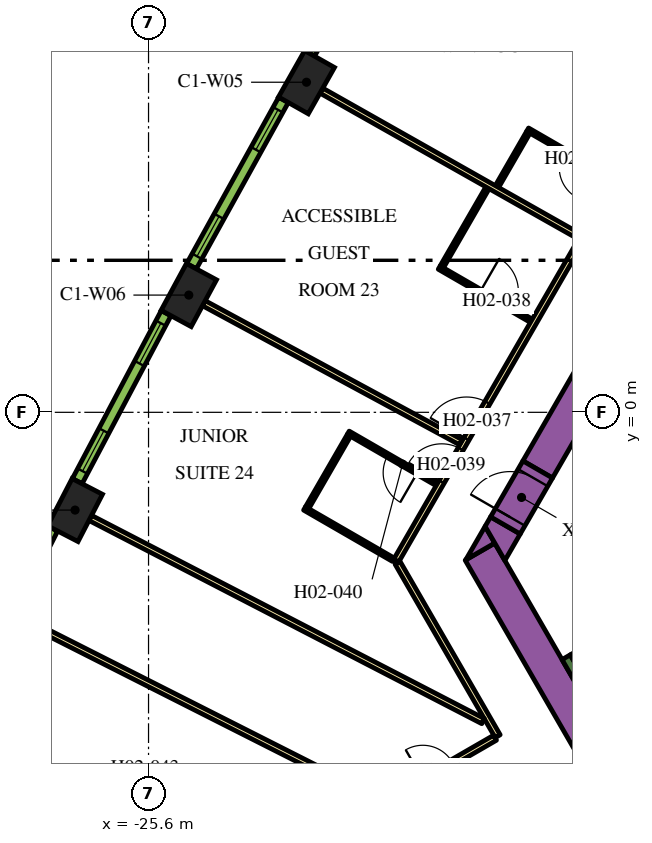
"""IFC4 building model, lengths in metres.
Left out: names, types, materials, properties, quantities, classifications, styles, units other than length and angle.
Written with IfcOpenShell. Run it as: python <this file> out.ifc"""

import sys

from ifc_helpers import new_model, si_unit, direction, frame, frame_2d, origin, origin_2d, place, context, subcontext, project, spatial, polyline, rectangle, outline, extrude, element, fill, save


model = new_model("IFC4")
c1 = context("Model", 3, precision=1e-05, world=origin(), true_north=direction((0.0, 1.0)))
c2 = subcontext(c1, "Body", "Model", "MODEL_VIEW")
j1 = project(units=[si_unit("LENGTHUNIT", "METRE"), si_unit("PLANEANGLEUNIT", "RADIAN")], contexts=[c1])
p1 = place(None, origin())
s1 = spatial("IfcSite", under=j1, at=p1, CompositionType="ELEMENT")
p2 = place(p1, origin())
s2 = spatial("IfcBuilding", under=s1, at=p2, CompositionType="ELEMENT")
p3 = place(p2, frame((0.0, 0.0, 43.2)))
s3 = spatial("IfcBuildingStorey", under=s2, at=p3, CompositionType="ELEMENT", Elevation=43.2)
for number, where, z_axis, x_axis in (
    (1, (-21.443, 8.685, 0.0), (0.0, 0.0, 1.0), (-0.492, -0.871, 0.0)),
    (2, (-24.54, 3.085, 0.0), (0.0, 0.0, 1.0), (-0.476, -0.88, 0.0)),
    (3, (-27.533, -2.572, 0.0), (0.0, 0.0, 1.0), (-0.459, -0.888, 0.0)),
):
    element("IfcColumn", number, at=place(p3, frame(where, z_axis=z_axis, x_axis=x_axis)), inside=s3, PredefinedType="COLUMN", context=c2, shape_type="SweptSolid", body=[
        extrude(rectangle(XDim=1.4, YDim=0.9, at=origin_2d()), origin(), (0.0, 0.0, 1.0), 3.9),
    ])
p4 = place(p3, frame((-15.36, -1.503, 0.0), z_axis=(0.0, 0.0, 1.0), x_axis=(0.50000389221, 0.866023156604, 0.0)))
e4 = element("IfcWall", 4, at=p4, inside=s3, PredefinedType="SOLIDWALL", context=c2, shape_type="SweptSolid", body=[
    extrude(rectangle(XDim=21.0, YDim=0.9, at=frame_2d((10.5, 0.0))), origin(), (0.0, 0.0, 1.0), 3.9),
])
p5 = place(p3, frame((-12.134, -11.883, 0.0), z_axis=(0.0, 0.0, 1.0), x_axis=(-0.500005339912, 0.866022320763, 0.0)))
e5 = element("IfcWall", 5, at=p5, inside=s3, PredefinedType="SOLIDWALL", context=c2, shape_type="SweptSolid", body=[
    extrude(rectangle(XDim=9.488, YDim=0.9, at=frame_2d((4.744, 0.0))), origin(), (0.0, 0.0, 1.0), 3.9),
])
p6 = place(p3, origin())
e6 = element("IfcWall", 6, at=p6, inside=s3, PredefinedType="SOLIDWALL", context=c2, shape_type="SweptSolid", body=[
    extrude(outline(polyline([(-16.489, -3.44), (-17.251, -3.88), (-16.743, -3.0), (-16.489, -3.44)])), origin(), (0.0, 0.0, 1.0), 3.9),
])
e7 = element("IfcWall", 7, at=p6, inside=s3, PredefinedType="SOLIDWALL", context=c2, shape_type="SweptSolid", body=[
    extrude(outline(polyline([(-15.82, -3.201), (-16.223, -3.9), (-16.743, -3.0), (-16.599, -2.751), (-15.82, -3.201)])), origin(), (0.0, 0.0, 1.0), 3.9),
])
p7 = place(p3, frame((-12.885, -9.431, 0.0), z_axis=(0.0, 0.0, 1.0), x_axis=(-0.500020560727, 0.866013532718, 0.0)))
e8 = element("IfcWall", 8, at=p7, inside=s3, PredefinedType="SOLIDWALL", context=c2, shape_type="SweptSolid", body=[
    extrude(rectangle(XDim=3.45, YDim=0.25, at=frame_2d((1.725, 0.0))), origin(), (0.0, 0.0, 1.0), 3.9),
])
p8 = place(p3, frame((-14.44, -6.49, 0.0), z_axis=(0.0, 0.0, 1.0), x_axis=(0.866022966069, 0.500004222222, 0.0)))
e9 = element("IfcWall", 9, at=p8, inside=s3, PredefinedType="SOLIDWALL", context=c2, shape_type="SweptSolid", body=[
    extrude(rectangle(XDim=6.8, YDim=0.25, at=frame_2d((3.4, 0.0))), origin(), (0.0, 0.0, 1.0), 3.9),
])
p9 = place(p3, frame((-16.209, -2.976, 0.0), z_axis=(0.0, 0.0, 1.0), x_axis=(0.499954529098, 0.86605165483, 0.0)))
e10 = element("IfcWall", 10, at=p9, inside=s3, PredefinedType="SOLIDWALL", context=c2, shape_type="SweptSolid", body=[
    extrude(rectangle(XDim=1.7, YDim=0.9, at=frame_2d((0.85, 0.0))), origin(), (0.0, 0.0, 1.0), 3.9),
])
p10 = place(p9, frame((0.25, 0.0, 0.0)))
e11 = element("IfcOpeningElement", 11, at=p10, cuts=e10, PredefinedType="OPENING", context=c2, shape_type="SweptSolid", body=[
    extrude(rectangle(XDim=1.2, YDim=2.1, at=frame_2d((0.6, 1.05))), frame((0.0, 0.46, 0.0), z_axis=(0.0, -1.0, 0.0), x_axis=(1.0, 0.0, 0.0)), (0.0, 0.0, 1.0), 0.92),
])
p11 = place(p3, frame((-19.081, -3.9, 0.0), z_axis=(0.0, 0.0, 1.0), x_axis=(0.499998313975, 0.866026377209, 0.0)))
e12 = element("IfcWall", 12, at=p11, inside=s3, PredefinedType="PARTITIONING", context=c2, shape_type="SweptSolid", body=[
    extrude(rectangle(XDim=25.766, YDim=0.15, at=frame_2d((12.883, 0.0))), origin(), (0.0, 0.0, 1.0), 2.75),
])
p12 = place(p11, frame((16.196, 0.0, 0.0)))
e13 = element("IfcOpeningElement", 13, at=p12, cuts=e12, PredefinedType="OPENING", context=c2, shape_type="SweptSolid", body=[
    extrude(rectangle(XDim=1.0, YDim=2.1, at=frame_2d((0.5, 1.05))), frame((0.0, 0.085, 0.0), z_axis=(0.0, -1.0, 0.0), x_axis=(1.0, 0.0, 0.0)), (0.0, 0.0, 1.0), 0.17),
])
p13 = place(p11, frame((14.889, 0.0, 0.0)))
e14 = element("IfcOpeningElement", 14, at=p13, cuts=e12, PredefinedType="OPENING", context=c2, shape_type="SweptSolid", body=[
    extrude(rectangle(XDim=1.0, YDim=2.1, at=frame_2d((0.5, 1.05))), frame((0.0, 0.085, 0.0), z_axis=(0.0, -1.0, 0.0), x_axis=(1.0, 0.0, 0.0)), (0.0, 0.0, 1.0), 0.17),
])
p14 = place(p11, frame((3.698, 0.0, 0.0)))
e15 = element("IfcOpeningElement", 15, at=p14, cuts=e12, PredefinedType="OPENING", context=c2, shape_type="SweptSolid", body=[
    extrude(rectangle(XDim=1.1, YDim=2.1, at=frame_2d((0.55, 1.05))), frame((0.0, 0.085, 0.0), z_axis=(0.0, -1.0, 0.0), x_axis=(1.0, 0.0, 0.0)), (0.0, 0.0, 1.0), 0.17),
])
p15 = place(p11, frame((2.392, 0.0, 0.0)))
e16 = element("IfcOpeningElement", 16, at=p15, cuts=e12, PredefinedType="OPENING", context=c2, shape_type="SweptSolid", body=[
    extrude(rectangle(XDim=1.0, YDim=2.1, at=frame_2d((0.5, 1.05))), frame((0.0, 0.085, 0.0), z_axis=(0.0, -1.0, 0.0), x_axis=(1.0, 0.0, 0.0)), (0.0, 0.0, 1.0), 0.17),
])
p16 = place(p3, frame((-16.412, -8.523, 0.0), z_axis=(0.0, 0.0, 1.0), x_axis=(-0.500001929737, 0.866024289647, 0.0)))
e17 = element("IfcWall", 17, at=p16, inside=s3, PredefinedType="PARTITIONING", context=c2, shape_type="SweptSolid", body=[
    extrude(rectangle(XDim=5.268, YDim=0.15, at=frame_2d((2.634, 0.0))), origin(), (0.0, 0.0, 1.0), 2.75),
])
p17 = place(p3, frame((-30.463, -16.635, 0.0), z_axis=(0.0, 0.0, 1.0), x_axis=(0.866022394896, 0.500005211512, 0.0)))
e18 = element("IfcWall", 18, at=p17, inside=s3, PredefinedType="PARTITIONING", context=c2, shape_type="SweptSolid", body=[
    extrude(rectangle(XDim=16.144, YDim=0.15, at=frame_2d((8.072, 0.0))), origin(), (0.0, 0.0, 1.0), 2.75),
])
p18 = place(p17, frame((13.948, 0.0, 0.0)))
e19 = element("IfcOpeningElement", 19, at=p18, cuts=e18, PredefinedType="OPENING", context=c2, shape_type="SweptSolid", body=[
    extrude(rectangle(XDim=0.9, YDim=2.1, at=frame_2d((0.45, 1.05))), frame((0.0, 0.085, 0.0), z_axis=(0.0, -1.0, 0.0), x_axis=(1.0, 0.0, 0.0)), (0.0, 0.0, 1.0), 0.17),
])
p19 = place(p17, frame((10.329, 0.0, 0.0)))
e20 = element("IfcOpeningElement", 20, at=p19, cuts=e18, PredefinedType="OPENING", context=c2, shape_type="SweptSolid", body=[
    extrude(rectangle(XDim=0.9, YDim=2.1, at=frame_2d((0.45, 1.05))), frame((0.0, 0.085, 0.0), z_axis=(0.0, -1.0, 0.0), x_axis=(1.0, 0.0, 0.0)), (0.0, 0.0, 1.0), 0.17),
])
p20 = place(p17, frame((7.274, 0.0, 0.0)))
e21 = element("IfcOpeningElement", 21, at=p20, cuts=e18, PredefinedType="OPENING", context=c2, shape_type="SweptSolid", body=[
    extrude(rectangle(XDim=1.0, YDim=2.1, at=frame_2d((0.5, 1.05))), frame((0.0, 0.085, 0.0), z_axis=(0.0, -1.0, 0.0), x_axis=(1.0, 0.0, 0.0)), (0.0, 0.0, 1.0), 0.17),
])
p21 = place(p3, frame((-30.018, -8.483, 0.0), z_axis=(0.0, 0.0, 1.0), x_axis=(0.896544505264, -0.44295366584, 0.0)))
e22 = element("IfcWall", 22, at=p21, inside=s3, PredefinedType="PARTITIONING", context=c2, shape_type="SweptSolid", body=[
    extrude(rectangle(XDim=8.079, YDim=0.15, at=frame_2d((4.04, 0.0))), origin(), (0.0, 0.0, 1.0), 2.75),
])
p22 = place(p3, frame((-29.12, -5.356, 0.0), z_axis=(0.0, 0.0, 1.0), x_axis=(0.892401965553, -0.451241323327, 0.0)))
e23 = element("IfcWall", 23, at=p22, inside=s3, PredefinedType="PARTITIONING", context=c2, shape_type="SweptSolid", body=[
    extrude(rectangle(XDim=10.729, YDim=0.15, at=frame_2d((5.364, 0.0))), origin(), (0.0, 0.0, 1.0), 2.75),
])
p23 = place(p3, frame((-24.145, 2.871, 0.0), z_axis=(0.0, 0.0, 1.0), x_axis=(0.879551725039, -0.475803281809, 0.0)))
e24 = element("IfcWall", 24, at=p23, inside=s3, PredefinedType="PARTITIONING", context=c2, shape_type="SweptSolid", body=[
    extrude(rectangle(XDim=7.688, YDim=0.15, at=frame_2d((3.844, 0.0))), origin(), (0.0, 0.0, 1.0), 2.75),
])
p24 = place(p3, frame((-27.134, -2.779, 0.0), z_axis=(0.0, 0.0, 1.0), x_axis=(0.8882049501, -0.459447457951, 0.0)))
e25 = element("IfcWall", 25, at=p24, inside=s3, PredefinedType="PARTITIONING", context=c2, shape_type="SweptSolid", body=[
    extrude(rectangle(XDim=11.638, YDim=0.15, at=frame_2d((5.819, 0.0))), origin(), (0.0, 0.0, 1.0), 2.75),
])
p25 = place(p3, frame((-21.052, 8.464, 0.0), z_axis=(0.0, 0.0, 1.0), x_axis=(0.87059371954, -0.492002617368, 0.0)))
e26 = element("IfcWall", 26, at=p25, inside=s3, PredefinedType="PARTITIONING", context=c2, shape_type="SweptSolid", body=[
    extrude(rectangle(XDim=7.803, YDim=0.15, at=frame_2d((3.902, 0.0))), origin(), (0.0, 0.0, 1.0), 2.75),
])
p26 = place(p3, frame((-13.373, 6.138, 0.0), z_axis=(0.0, 0.0, 1.0), x_axis=(-0.866062058628, 0.499936506574, 0.0)))
e27 = element("IfcWall", 27, at=p26, inside=s3, PredefinedType="PARTITIONING", context=c2, shape_type="SweptSolid", body=[
    extrude(rectangle(XDim=2.6, YDim=0.1, at=frame_2d((1.3, 0.0))), origin(), (0.0, 0.0, 1.0), 2.75),
])
p27 = place(p26, frame((0.6, 0.0, 0.0)))
e28 = element("IfcOpeningElement", 28, at=p27, cuts=e27, PredefinedType="OPENING", context=c2, shape_type="SweptSolid", body=[
    extrude(rectangle(XDim=0.9, YDim=2.1, at=frame_2d((0.45, 1.05))), frame((0.0, 0.06, 0.0), z_axis=(0.0, -1.0, 0.0), x_axis=(1.0, 0.0, 0.0)), (0.0, 0.0, 1.0), 0.12),
])
p28 = place(p3, frame((-15.606, 7.37, 0.0), z_axis=(0.0, 0.0, 1.0), x_axis=(-0.499974350878, -0.866040211805, 0.0)))
e29 = element("IfcWall", 29, at=p28, inside=s3, PredefinedType="PARTITIONING", context=c2, shape_type="SweptSolid", body=[
    extrude(rectangle(XDim=1.65, YDim=0.1, at=frame_2d((0.825, 0.0))), origin(), (0.0, 0.0, 1.0), 2.75),
])
p29 = place(p3, frame((-17.951, 3.808, 0.0), z_axis=(0.0, 0.0, 1.0), x_axis=(0.866034573852, -0.49998411664, 0.0)))
e30 = element("IfcWall", 30, at=p29, inside=s3, PredefinedType="PARTITIONING", context=c2, shape_type="SweptSolid", body=[
    extrude(rectangle(XDim=2.8, YDim=0.1, at=frame_2d((1.4, 0.0))), origin(), (0.0, 0.0, 1.0), 2.75),
])
p30 = place(p29, frame((1.25, 0.0, 0.0)))
e31 = element("IfcOpeningElement", 31, at=p30, cuts=e30, PredefinedType="OPENING", context=c2, shape_type="SweptSolid", body=[
    extrude(rectangle(XDim=1.0, YDim=2.1, at=frame_2d((0.5, 1.05))), frame((0.0, 0.06, 0.0), z_axis=(0.0, -1.0, 0.0), x_axis=(1.0, 0.0, 0.0)), (0.0, 0.0, 1.0), 0.12),
])
p31 = place(p3, frame((-17.878, 3.835, 0.0), z_axis=(0.0, 0.0, 1.0), x_axis=(0.500061428766, 0.865989934965, 0.0)))
e32 = element("IfcWall", 32, at=p31, inside=s3, PredefinedType="PARTITIONING", context=c2, shape_type="SweptSolid", body=[
    extrude(rectangle(XDim=2.39, YDim=0.1, at=frame_2d((1.195, 0.0))), origin(), (0.0, 0.0, 1.0), 2.75),
])
p32 = place(p3, frame((-18.006, -1.888, 0.0), z_axis=(0.0, 0.0, 1.0), x_axis=(-0.866036505625, 0.499980770555, 0.0)))
e33 = element("IfcWall", 33, at=p32, inside=s3, PredefinedType="PARTITIONING", context=c2, shape_type="SweptSolid", body=[
    extrude(rectangle(XDim=2.7, YDim=0.1, at=frame_2d((1.35, 0.0))), origin(), (0.0, 0.0, 1.0), 2.75),
])
p33 = place(p32, frame((0.6, 0.0, 0.0)))
e34 = element("IfcOpeningElement", 34, at=p33, cuts=e33, PredefinedType="OPENING", context=c2, shape_type="SweptSolid", body=[
    extrude(rectangle(XDim=0.9, YDim=2.1, at=frame_2d((0.45, 1.05))), frame((0.0, 0.06, 0.0), z_axis=(0.0, -1.0, 0.0), x_axis=(1.0, 0.0, 0.0)), (0.0, 0.0, 1.0), 0.12),
])
p34 = place(p3, frame((-20.326, -0.606, 0.0), z_axis=(0.0, 0.0, 1.0), x_axis=(-0.499946605688, -0.86605622881, 0.0)))
e35 = element("IfcWall", 35, at=p34, inside=s3, PredefinedType="PARTITIONING", context=c2, shape_type="SweptSolid", body=[
    extrude(rectangle(XDim=2.2, YDim=0.1, at=frame_2d((1.1, 0.0))), origin(), (0.0, 0.0, 1.0), 2.75),
])
p35 = place(p3, frame((-19.156, -3.88, 0.0), z_axis=(0.0, 0.0, 1.0), x_axis=(-0.86599734893, 0.500048589285, 0.0)))
e36 = element("IfcWall", 36, at=p35, inside=s3, PredefinedType="PARTITIONING", context=c2, shape_type="SweptSolid", body=[
    extrude(rectangle(XDim=2.7, YDim=0.1, at=frame_2d((1.35, 0.0))), origin(), (0.0, 0.0, 1.0), 2.75),
])
p36 = place(p3, frame((-18.858, 13.773, 0.0), z_axis=(0.0, 0.0, 1.0), x_axis=(-0.50002123722, -0.866013142123, 0.0)))
e37 = element("IfcWall", 37, at=p36, inside=s3, PredefinedType="SOLIDWALL", context=c2, shape_type="SweptSolid", body=[
    extrude(rectangle(XDim=4.998, YDim=0.29, at=frame_2d((2.499, 0.0))), origin(), (0.0, 0.0, 1.0), 3.65),
])
p37 = place(p36, frame((0.297, 0.0, 0.9)))
e38 = element("IfcOpeningElement", 38, at=p37, cuts=e37, PredefinedType="OPENING", context=c2, shape_type="SweptSolid", body=[
    extrude(rectangle(XDim=1.2, YDim=2.15, at=frame_2d((0.6, 1.075))), frame((0.0, 0.155, 0.0), z_axis=(0.0, -1.0, 0.0), x_axis=(1.0, 0.0, 0.0)), (0.0, 0.0, 1.0), 0.31),
])
p38 = place(p36, frame((3.501, 0.0, 0.9)))
e39 = element("IfcOpeningElement", 39, at=p38, cuts=e37, PredefinedType="OPENING", context=c2, shape_type="SweptSolid", body=[
    extrude(rectangle(XDim=1.2, YDim=2.15, at=frame_2d((0.6, 1.075))), frame((0.0, 0.155, 0.0), z_axis=(0.0, -1.0, 0.0), x_axis=(1.0, 0.0, 0.0)), (0.0, 0.0, 1.0), 0.31),
])
p39 = place(p3, frame((-22.05, 8.22, 0.0), z_axis=(0.0, 0.0, 1.0), x_axis=(-0.483912572871, -0.875116347589, 0.0)))
e40 = element("IfcWall", 40, at=p39, inside=s3, PredefinedType="SOLIDWALL", context=c2, shape_type="SweptSolid", body=[
    extrude(rectangle(XDim=4.998, YDim=0.29, at=frame_2d((2.499, 0.0))), origin(), (0.0, 0.0, 1.0), 3.65),
])
p40 = place(p39, frame((0.297, 0.0, 0.9)))
e41 = element("IfcOpeningElement", 41, at=p40, cuts=e40, PredefinedType="OPENING", context=c2, shape_type="SweptSolid", body=[
    extrude(rectangle(XDim=1.2, YDim=2.15, at=frame_2d((0.6, 1.075))), frame((0.0, 0.155, 0.0), z_axis=(0.0, -1.0, 0.0), x_axis=(1.0, 0.0, 0.0)), (0.0, 0.0, 1.0), 0.31),
])
p41 = place(p39, frame((3.501, 0.0, 0.9)))
e42 = element("IfcOpeningElement", 42, at=p41, cuts=e40, PredefinedType="OPENING", context=c2, shape_type="SweptSolid", body=[
    extrude(rectangle(XDim=1.2, YDim=2.15, at=frame_2d((0.6, 1.075))), frame((0.0, 0.155, 0.0), z_axis=(0.0, -1.0, 0.0), x_axis=(1.0, 0.0, 0.0)), (0.0, 0.0, 1.0), 0.31),
])
p42 = place(p3, frame((-25.138, 2.608, 0.0), z_axis=(0.0, 0.0, 1.0), x_axis=(-0.467629620899, -0.883924509026, 0.0)))
e43 = element("IfcWall", 43, at=p42, inside=s3, PredefinedType="SOLIDWALL", context=c2, shape_type="SweptSolid", body=[
    extrude(rectangle(XDim=4.998, YDim=0.29, at=frame_2d((2.499, 0.0))), origin(), (0.0, 0.0, 1.0), 3.65),
])
p43 = place(p42, frame((0.297, 0.0, 0.9)))
e44 = element("IfcOpeningElement", 44, at=p43, cuts=e43, PredefinedType="OPENING", context=c2, shape_type="SweptSolid", body=[
    extrude(rectangle(XDim=1.2, YDim=2.15, at=frame_2d((0.6, 1.075))), frame((0.0, 0.155, 0.0), z_axis=(0.0, -1.0, 0.0), x_axis=(1.0, 0.0, 0.0)), (0.0, 0.0, 1.0), 0.31),
])
p44 = place(p42, frame((3.501, 0.0, 0.9)))
e45 = element("IfcOpeningElement", 45, at=p44, cuts=e43, PredefinedType="OPENING", context=c2, shape_type="SweptSolid", body=[
    extrude(rectangle(XDim=1.2, YDim=2.15, at=frame_2d((0.6, 1.075))), frame((0.0, 0.155, 0.0), z_axis=(0.0, -1.0, 0.0), x_axis=(1.0, 0.0, 0.0)), (0.0, 0.0, 1.0), 0.31),
])
p45 = place(p3, frame((-28.122, -3.06, 0.0), z_axis=(0.0, 0.0, 1.0), x_axis=(-0.451233929645, -0.892405704115, 0.0)))
e46 = element("IfcWall", 46, at=p45, inside=s3, PredefinedType="SOLIDWALL", context=c2, shape_type="SweptSolid", body=[
    extrude(rectangle(XDim=4.998, YDim=0.29, at=frame_2d((2.499, 0.0))), origin(), (0.0, 0.0, 1.0), 3.65),
])
p46 = place(p45, frame((0.297, 0.0, 0.9)))
e47 = element("IfcOpeningElement", 47, at=p46, cuts=e46, PredefinedType="OPENING", context=c2, shape_type="SweptSolid", body=[
    extrude(rectangle(XDim=1.2, YDim=2.15, at=frame_2d((0.6, 1.075))), frame((0.0, 0.155, 0.0), z_axis=(0.0, -1.0, 0.0), x_axis=(1.0, 0.0, 0.0)), (0.0, 0.0, 1.0), 0.31),
])
p47 = place(p45, frame((3.501, 0.0, 0.9)))
e48 = element("IfcOpeningElement", 48, at=p47, cuts=e46, PredefinedType="OPENING", context=c2, shape_type="SweptSolid", body=[
    extrude(rectangle(XDim=1.2, YDim=2.15, at=frame_2d((0.6, 1.075))), frame((0.0, 0.155, 0.0), z_axis=(0.0, -1.0, 0.0), x_axis=(1.0, 0.0, 0.0)), (0.0, 0.0, 1.0), 0.31),
])
p48 = place(p10, origin())
e49 = element("IfcDoor", 49, at=p48, inside=s3, OperationType="SINGLE_SWING_LEFT", PredefinedType="DOOR", context=c2, shape_type="SweptSolid", body=[
    extrude(rectangle(XDim=1.2, YDim=2.1, at=frame_2d((0.6, 1.05))), frame((0.0, 0.025, 0.0), z_axis=(0.0, -1.0, 0.0), x_axis=(1.0, 0.0, 0.0)), (0.0, 0.0, 1.0), 0.05),
])
fill(e11, e49)
p49 = place(p27, origin())
e50 = element("IfcDoor", 50, at=p49, inside=s3, OperationType="SINGLE_SWING_LEFT", PredefinedType="DOOR", context=c2, shape_type="SweptSolid", body=[
    extrude(rectangle(XDim=0.9, YDim=2.1, at=frame_2d((0.45, 1.05))), frame((0.0, 0.025, 0.0), z_axis=(0.0, -1.0, 0.0), x_axis=(1.0, 0.0, 0.0)), (0.0, 0.0, 1.0), 0.05),
])
fill(e28, e50)
p50 = place(p14, origin())
e51 = element("IfcDoor", 51, at=p50, inside=s3, OperationType="SINGLE_SWING_LEFT", PredefinedType="DOOR", context=c2, shape_type="SweptSolid", body=[
    extrude(rectangle(XDim=1.1, YDim=2.1, at=frame_2d((0.55, 1.05))), frame((0.0, 0.025, 0.0), z_axis=(0.0, -1.0, 0.0), x_axis=(1.0, 0.0, 0.0)), (0.0, 0.0, 1.0), 0.05),
])
fill(e15, e51)
p51 = place(p30, origin())
e52 = element("IfcDoor", 52, at=p51, inside=s3, OperationType="SINGLE_SWING_LEFT", PredefinedType="DOOR", context=c2, shape_type="SweptSolid", body=[
    extrude(rectangle(XDim=1.0, YDim=2.1, at=frame_2d((0.5, 1.05))), frame((0.0, 0.025, 0.0), z_axis=(0.0, -1.0, 0.0), x_axis=(1.0, 0.0, 0.0)), (0.0, 0.0, 1.0), 0.05),
])
fill(e31, e52)
p52 = place(p15, origin())
e53 = element("IfcDoor", 53, at=p52, inside=s3, OperationType="SINGLE_SWING_RIGHT", PredefinedType="DOOR", context=c2, shape_type="SweptSolid", body=[
    extrude(rectangle(XDim=1.0, YDim=2.1, at=frame_2d((0.5, 1.05))), frame((0.0, 0.025, 0.0), z_axis=(0.0, -1.0, 0.0), x_axis=(1.0, 0.0, 0.0)), (0.0, 0.0, 1.0), 0.05),
])
fill(e16, e53)
p53 = place(p33, origin())
e54 = element("IfcDoor", 54, at=p53, inside=s3, OperationType="SINGLE_SWING_RIGHT", PredefinedType="DOOR", context=c2, shape_type="SweptSolid", body=[
    extrude(rectangle(XDim=0.9, YDim=2.1, at=frame_2d((0.45, 1.05))), frame((0.0, 0.025, 0.0), z_axis=(0.0, -1.0, 0.0), x_axis=(1.0, 0.0, 0.0)), (0.0, 0.0, 1.0), 0.05),
])
fill(e34, e54)
p54 = place(p18, origin())
e55 = element("IfcDoor", 55, at=p54, inside=s3, OperationType="SINGLE_SWING_LEFT", PredefinedType="DOOR", context=c2, shape_type="SweptSolid", body=[
    extrude(rectangle(XDim=0.9, YDim=2.1, at=frame_2d((0.45, 1.05))), frame((0.0, 0.025, 0.0), z_axis=(0.0, -1.0, 0.0), x_axis=(1.0, 0.0, 0.0)), (0.0, 0.0, 1.0), 0.05),
])
fill(e19, e55)
p55 = place(p40, origin())
e56 = element("IfcWindow", 56, at=p55, inside=s3, PartitioningType="DOUBLE_PANEL_VERTICAL", PredefinedType="WINDOW", context=c2, shape_type="SweptSolid", body=[
    extrude(rectangle(XDim=1.2, YDim=2.15, at=frame_2d((0.6, 1.075))), frame((0.0, 0.015, 0.0), z_axis=(0.0, -1.0, 0.0), x_axis=(1.0, 0.0, 0.0)), (0.0, 0.0, 1.0), 0.06),
])
fill(e41, e56)
p56 = place(p41, origin())
e57 = element("IfcWindow", 57, at=p56, inside=s3, PartitioningType="DOUBLE_PANEL_VERTICAL", PredefinedType="WINDOW", context=c2, shape_type="SweptSolid", body=[
    extrude(rectangle(XDim=1.2, YDim=2.15, at=frame_2d((0.6, 1.075))), frame((0.0, 0.015, 0.0), z_axis=(0.0, -1.0, 0.0), x_axis=(1.0, 0.0, 0.0)), (0.0, 0.0, 1.0), 0.06),
])
fill(e42, e57)
p57 = place(p43, origin())
e58 = element("IfcWindow", 58, at=p57, inside=s3, PartitioningType="DOUBLE_PANEL_VERTICAL", PredefinedType="WINDOW", context=c2, shape_type="SweptSolid", body=[
    extrude(rectangle(XDim=1.2, YDim=2.15, at=frame_2d((0.6, 1.075))), frame((0.0, 0.015, 0.0), z_axis=(0.0, -1.0, 0.0), x_axis=(1.0, 0.0, 0.0)), (0.0, 0.0, 1.0), 0.06),
])
fill(e44, e58)
p58 = place(p44, origin())
e59 = element("IfcWindow", 59, at=p58, inside=s3, PartitioningType="DOUBLE_PANEL_VERTICAL", PredefinedType="WINDOW", context=c2, shape_type="SweptSolid", body=[
    extrude(rectangle(XDim=1.2, YDim=2.15, at=frame_2d((0.6, 1.075))), frame((0.0, 0.015, 0.0), z_axis=(0.0, -1.0, 0.0), x_axis=(1.0, 0.0, 0.0)), (0.0, 0.0, 1.0), 0.06),
])
fill(e45, e59)
save(model, sys.argv[1])
